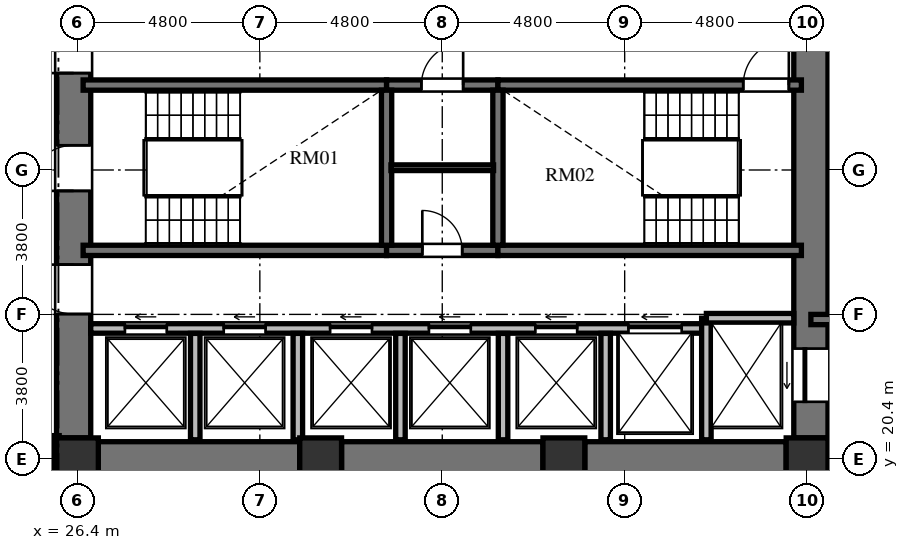
"""IFC4 building model, lengths in metres.
Left out: names, types, materials, properties, quantities, classifications, styles, units other than length and angle.
Written with IfcOpenShell. Run it as: python <this file> out.ifc"""

import sys

from ifc_helpers import new_model, si_unit, direction, frame, frame_2d, origin, origin_2d, place, context, subcontext, project, spatial, rectangle, extrude, element, fill, save


model = new_model("IFC4")
c1 = context("Model", 3, precision=1e-05, world=origin(), true_north=direction((0.0, 1.0)))
c2 = subcontext(c1, "Body", "Model", "MODEL_VIEW")
j1 = project(units=[si_unit("LENGTHUNIT", "METRE"), si_unit("PLANEANGLEUNIT", "RADIAN")], contexts=[c1])
p1 = place(None, origin())
s1 = spatial("IfcSite", under=j1, at=p1, CompositionType="ELEMENT")
p2 = place(p1, origin())
s2 = spatial("IfcBuilding", under=s1, at=p2, CompositionType="ELEMENT")
p3 = place(p2, frame((0.0, 0.0, 76.272)))
s3 = spatial("IfcBuildingStorey", under=s2, at=p3, CompositionType="ELEMENT", Elevation=76.272)
for number, where, z_axis, x_axis in (
    (1, (26.4, 20.4, 0.0), (0.0, 0.0, 1.0), (1.0, 0.0, 0.0)),
    (2, (32.8, 20.4, 0.0), (0.0, 0.0, 1.0), (1.0, 0.0, 0.0)),
    (3, (39.2, 20.4, 0.0), (0.0, 0.0, 1.0), (1.0, 0.0, 0.0)),
    (4, (45.6, 20.4, 0.0), (0.0, 0.0, 1.0), (1.0, 0.0, 0.0)),
):
    element("IfcColumn", number, at=place(p3, frame(where, z_axis=z_axis, x_axis=x_axis)), inside=s3, PredefinedType="COLUMN", context=c2, shape_type="SweptSolid", body=[
        extrude(rectangle(XDim=1.1, YDim=1.1, at=origin_2d()), origin(), (0.0, 0.0, 1.0), 5.472),
    ])
p4 = place(p3, frame((26.3, 20.95, 0.0), z_axis=(0.0, 0.0, 1.0), x_axis=(0.0, 1.0, 0.0)))
e5 = element("IfcWall", 5, at=p4, inside=s3, PredefinedType="SHEAR", context=c2, shape_type="SweptSolid", body=[
    extrude(rectangle(XDim=14.1, YDim=0.9, at=frame_2d((7.05, 0.0))), origin(), (0.0, 0.0, 1.0), 5.472),
])
p5 = place(p4, frame((6.5, 0.0, 0.0)))
e6 = element("IfcOpeningElement", 6, at=p5, cuts=e5, PredefinedType="OPENING", context=c2, shape_type="SweptSolid", body=[
    extrude(rectangle(XDim=1.2, YDim=2.15, at=frame_2d((0.6, 1.075))), frame((0.0, 0.46, 0.0), z_axis=(0.0, -1.0, 0.0), x_axis=(1.0, 0.0, 0.0)), (0.0, 0.0, 1.0), 0.92),
])
p6 = place(p4, frame((9.6, 0.0, 0.0)))
e7 = element("IfcOpeningElement", 7, at=p6, cuts=e5, PredefinedType="OPENING", context=c2, shape_type="SweptSolid", body=[
    extrude(rectangle(XDim=1.3, YDim=2.2, at=frame_2d((0.65, 1.1))), frame((0.0, 0.46, 0.0), z_axis=(0.0, -1.0, 0.0), x_axis=(1.0, 0.0, 0.0)), (0.0, 0.0, 1.0), 0.92),
])
p7 = place(p4, frame((3.26, 0.0, 0.0)))
e8 = element("IfcOpeningElement", 8, at=p7, cuts=e5, PredefinedType="OPENING", context=c2, shape_type="SweptSolid", body=[
    extrude(rectangle(XDim=1.3, YDim=2.2, at=frame_2d((0.65, 1.1))), frame((0.0, 0.46, 0.0), z_axis=(0.0, -1.0, 0.0), x_axis=(1.0, 0.0, 0.0)), (0.0, 0.0, 1.0), 0.92),
])
p8 = place(p3, frame((45.7, 20.95, 0.0), z_axis=(0.0, 0.0, 1.0), x_axis=(0.0, 1.0, 0.0)))
e9 = element("IfcWall", 9, at=p8, inside=s3, PredefinedType="SHEAR", context=c2, shape_type="SweptSolid", body=[
    extrude(rectangle(XDim=14.1, YDim=0.9, at=frame_2d((7.05, 0.0))), origin(), (0.0, 0.0, 1.0), 5.472),
])
p9 = place(p8, frame((11.75, 0.0, 0.0)))
e10 = element("IfcOpeningElement", 10, at=p9, cuts=e9, PredefinedType="OPENING", context=c2, shape_type="SweptSolid", body=[
    extrude(rectangle(XDim=1.4, YDim=2.3, at=frame_2d((0.7, 1.15))), frame((0.0, 0.46, 0.0), z_axis=(0.0, -1.0, 0.0), x_axis=(1.0, 0.0, 0.0)), (0.0, 0.0, 1.0), 0.92),
])
p10 = place(p8, frame((0.95, 0.0, 0.0)))
e11 = element("IfcOpeningElement", 11, at=p10, cuts=e9, PredefinedType="OPENING", context=c2, shape_type="SweptSolid", body=[
    extrude(rectangle(XDim=1.4, YDim=2.3, at=frame_2d((0.7, 1.15))), frame((0.0, 0.46, 0.0), z_axis=(0.0, -1.0, 0.0), x_axis=(1.0, 0.0, 0.0)), (0.0, 0.0, 1.0), 0.92),
])
p11 = place(p3, frame((26.95, 20.4, 0.0), z_axis=(0.0, 0.0, 1.0), x_axis=(1.0, 0.0, 0.0)))
e12 = element("IfcWall", 12, at=p11, inside=s3, PredefinedType="SHEAR", context=c2, shape_type="SweptSolid", body=[
    extrude(rectangle(XDim=5.3, YDim=0.9, at=frame_2d((2.65, 0.0))), origin(), (0.0, 0.0, 1.0), 5.472),
])
p12 = place(p3, frame((33.35, 20.4, 0.0), z_axis=(0.0, 0.0, 1.0), x_axis=(1.0, 0.0, 0.0)))
e13 = element("IfcWall", 13, at=p12, inside=s3, PredefinedType="SHEAR", context=c2, shape_type="SweptSolid", body=[
    extrude(rectangle(XDim=5.3, YDim=0.9, at=frame_2d((2.65, 0.0))), origin(), (0.0, 0.0, 1.0), 5.472),
])
p13 = place(p3, frame((39.75, 20.4, 0.0), z_axis=(0.0, 0.0, 1.0), x_axis=(1.0, 0.0, 0.0)))
e14 = element("IfcWall", 14, at=p13, inside=s3, PredefinedType="SHEAR", context=c2, shape_type="SweptSolid", body=[
    extrude(rectangle(XDim=5.3, YDim=0.9, at=frame_2d((2.65, 0.0))), origin(), (0.0, 0.0, 1.0), 5.472),
])
p14 = place(p3, frame((26.55, 30.235, 0.0), z_axis=(0.0, 0.0, 1.0), x_axis=(1.0, 0.0, 0.0)))
e15 = element("IfcWall", 15, at=p14, inside=s3, PredefinedType="SHEAR", context=c2, shape_type="SweptSolid", body=[
    extrude(rectangle(XDim=7.985, YDim=0.27, at=frame_2d((3.992, 0.0))), origin(), (0.0, 0.0, 1.0), 5.472),
])
p15 = place(p3, frame((34.535, 30.235, 0.0), z_axis=(0.0, 0.0, 1.0), x_axis=(1.0, 0.0, 0.0)))
e16 = element("IfcWall", 16, at=p15, inside=s3, PredefinedType="SHEAR", context=c2, shape_type="SweptSolid", body=[
    extrude(rectangle(XDim=2.93, YDim=0.27, at=frame_2d((1.465, 0.0))), origin(), (0.0, 0.0, 1.0), 5.472),
])
p16 = place(p15, frame((0.915, 0.0, 0.0)))
e17 = element("IfcOpeningElement", 17, at=p16, cuts=e16, PredefinedType="OPENING", context=c2, shape_type="SweptSolid", body=[
    extrude(rectangle(XDim=1.1, YDim=2.15, at=frame_2d((0.55, 1.075))), frame((0.0, 0.145, 0.0), z_axis=(0.0, -1.0, 0.0), x_axis=(1.0, 0.0, 0.0)), (0.0, 0.0, 1.0), 0.29),
])
p17 = place(p3, frame((37.465, 30.235, 0.0), z_axis=(0.0, 0.0, 1.0), x_axis=(1.0, 0.0, 0.0)))
e18 = element("IfcWall", 18, at=p17, inside=s3, PredefinedType="SHEAR", context=c2, shape_type="SweptSolid", body=[
    extrude(rectangle(XDim=7.985, YDim=0.27, at=frame_2d((3.992, 0.0))), origin(), (0.0, 0.0, 1.0), 5.472),
])
p18 = place(p17, frame((6.455, 0.0, 0.0)))
e19 = element("IfcOpeningElement", 19, at=p18, cuts=e18, PredefinedType="OPENING", context=c2, shape_type="SweptSolid", body=[
    extrude(rectangle(XDim=1.2, YDim=2.15, at=frame_2d((0.6, 1.075))), frame((0.0, 0.145, 0.0), z_axis=(0.0, -1.0, 0.0), x_axis=(1.0, 0.0, 0.0)), (0.0, 0.0, 1.0), 0.29),
])
p19 = place(p3, frame((26.55, 25.885, 0.0), z_axis=(0.0, 0.0, 1.0), x_axis=(1.0, 0.0, 0.0)))
e20 = element("IfcWall", 20, at=p19, inside=s3, PredefinedType="SHEAR", context=c2, shape_type="SweptSolid", body=[
    extrude(rectangle(XDim=7.985, YDim=0.27, at=frame_2d((3.992, 0.0))), origin(), (0.0, 0.0, 1.0), 5.472),
])
p20 = place(p3, frame((34.535, 25.885, 0.0), z_axis=(0.0, 0.0, 1.0), x_axis=(1.0, 0.0, 0.0)))
e21 = element("IfcWall", 21, at=p20, inside=s3, PredefinedType="SHEAR", context=c2, shape_type="SweptSolid", body=[
    extrude(rectangle(XDim=2.93, YDim=0.27, at=frame_2d((1.465, 0.0))), origin(), (0.0, 0.0, 1.0), 5.472),
])
p21 = place(p20, frame((0.94, 0.0, 0.0)))
e22 = element("IfcOpeningElement", 22, at=p21, cuts=e21, PredefinedType="OPENING", context=c2, shape_type="SweptSolid", body=[
    extrude(rectangle(XDim=1.05, YDim=2.15, at=frame_2d((0.525, 1.075))), frame((0.0, 0.145, 0.0), z_axis=(0.0, -1.0, 0.0), x_axis=(1.0, 0.0, 0.0)), (0.0, 0.0, 1.0), 0.29),
])
p22 = place(p3, frame((37.465, 25.885, 0.0), z_axis=(0.0, 0.0, 1.0), x_axis=(1.0, 0.0, 0.0)))
e23 = element("IfcWall", 23, at=p22, inside=s3, PredefinedType="SHEAR", context=c2, shape_type="SweptSolid", body=[
    extrude(rectangle(XDim=7.985, YDim=0.27, at=frame_2d((3.992, 0.0))), origin(), (0.0, 0.0, 1.0), 5.472),
])
for number, where, z_axis, x_axis in (
    (24, (34.535, 26.02, 0.0), (0.0, 0.0, 1.0), (0.0, 1.0, 0.0)),
    (25, (37.465, 26.02, 0.0), (0.0, 0.0, 1.0), (0.0, 1.0, 0.0)),
):
    element("IfcWall", number, at=place(p3, frame(where, z_axis=z_axis, x_axis=x_axis)), inside=s3, PredefinedType="SHEAR", context=c2, shape_type="SweptSolid", body=[
        extrude(rectangle(XDim=4.08, YDim=0.27, at=frame_2d((2.04, 0.0))), origin(), (0.0, 0.0, 1.0), 5.472),
    ])
p23 = place(p3, frame((34.65, 28.06, 0.0), z_axis=(0.0, 0.0, 1.0), x_axis=(1.0, 0.0, 0.0)))
e26 = element("IfcWall", 26, at=p23, inside=s3, PredefinedType="PARTITIONING", context=c2, shape_type="SweptSolid", body=[
    extrude(rectangle(XDim=2.7, YDim=0.15, at=frame_2d((1.35, 0.0))), origin(), (0.0, 0.0, 1.0), 5.022),
])
p24 = place(p3, frame((26.75, 23.83, 0.0), z_axis=(0.0, 0.0, 1.0), x_axis=(1.0, 0.0, 0.0)))
e27 = element("IfcWall", 27, at=p24, inside=s3, PredefinedType="SOLIDWALL", context=c2, shape_type="SweptSolid", body=[
    extrude(rectangle(XDim=16.2, YDim=0.25, at=frame_2d((8.1, 0.0))), origin(), (0.0, 0.0, 1.0), 5.022),
])
p25 = place(p24, frame((0.9, 0.0, 0.0)))
e28 = element("IfcOpeningElement", 28, at=p25, cuts=e27, PredefinedType="OPENING", context=c2, shape_type="SweptSolid", body=[
    extrude(rectangle(XDim=1.1, YDim=2.2, at=frame_2d((0.55, 1.1))), frame((0.0, 0.135, 0.0), z_axis=(0.0, -1.0, 0.0), x_axis=(1.0, 0.0, 0.0)), (0.0, 0.0, 1.0), 0.27),
])
p26 = place(p24, frame((3.5, 0.0, 0.0)))
e29 = element("IfcOpeningElement", 29, at=p26, cuts=e27, PredefinedType="OPENING", context=c2, shape_type="SweptSolid", body=[
    extrude(rectangle(XDim=1.1, YDim=2.2, at=frame_2d((0.55, 1.1))), frame((0.0, 0.135, 0.0), z_axis=(0.0, -1.0, 0.0), x_axis=(1.0, 0.0, 0.0)), (0.0, 0.0, 1.0), 0.27),
])
p27 = place(p24, frame((6.3, 0.0, 0.0)))
e30 = element("IfcOpeningElement", 30, at=p27, cuts=e27, PredefinedType="OPENING", context=c2, shape_type="SweptSolid", body=[
    extrude(rectangle(XDim=1.1, YDim=2.2, at=frame_2d((0.55, 1.1))), frame((0.0, 0.135, 0.0), z_axis=(0.0, -1.0, 0.0), x_axis=(1.0, 0.0, 0.0)), (0.0, 0.0, 1.0), 0.27),
])
p28 = place(p24, frame((8.9, 0.0, 0.0)))
e31 = element("IfcOpeningElement", 31, at=p28, cuts=e27, PredefinedType="OPENING", context=c2, shape_type="SweptSolid", body=[
    extrude(rectangle(XDim=1.1, YDim=2.2, at=frame_2d((0.55, 1.1))), frame((0.0, 0.135, 0.0), z_axis=(0.0, -1.0, 0.0), x_axis=(1.0, 0.0, 0.0)), (0.0, 0.0, 1.0), 0.27),
])
p29 = place(p24, frame((11.7, 0.0, 0.0)))
e32 = element("IfcOpeningElement", 32, at=p29, cuts=e27, PredefinedType="OPENING", context=c2, shape_type="SweptSolid", body=[
    extrude(rectangle(XDim=1.1, YDim=2.2, at=frame_2d((0.55, 1.1))), frame((0.0, 0.135, 0.0), z_axis=(0.0, -1.0, 0.0), x_axis=(1.0, 0.0, 0.0)), (0.0, 0.0, 1.0), 0.27),
])
p30 = place(p24, frame((14.15, 0.0, 0.0)))
e33 = element("IfcOpeningElement", 33, at=p30, cuts=e27, PredefinedType="OPENING", context=c2, shape_type="SweptSolid", body=[
    extrude(rectangle(XDim=1.4, YDim=2.3, at=frame_2d((0.7, 1.15))), frame((0.0, 0.135, 0.0), z_axis=(0.0, -1.0, 0.0), x_axis=(1.0, 0.0, 0.0)), (0.0, 0.0, 1.0), 0.27),
])
p31 = place(p3, frame((42.95, 20.9, 0.0), z_axis=(0.0, 0.0, 1.0), x_axis=(0.0, 1.0, 0.0)))
e34 = element("IfcWall", 34, at=p31, inside=s3, PredefinedType="SOLIDWALL", context=c2, shape_type="SweptSolid", body=[
    extrude(rectangle(XDim=3.2, YDim=0.25, at=frame_2d((1.6, 0.0))), origin(), (0.0, 0.0, 1.0), 5.022),
])
p32 = place(p3, frame((42.95, 24.1, 0.0), z_axis=(0.0, 0.0, 1.0), x_axis=(1.0, 0.0, 0.0)))
e35 = element("IfcWall", 35, at=p32, inside=s3, PredefinedType="SOLIDWALL", context=c2, shape_type="SweptSolid", body=[
    extrude(rectangle(XDim=2.3, YDim=0.25, at=frame_2d((1.15, 0.0))), origin(), (0.0, 0.0, 1.0), 5.022),
])
for number, where, z_axis, x_axis in (
    (36, (29.5, 20.9, 0.0), (0.0, 0.0, 1.0), (0.0, 1.0, 0.0)),
    (37, (32.2, 20.9, 0.0), (0.0, 0.0, 1.0), (0.0, 1.0, 0.0)),
    (38, (34.9, 20.9, 0.0), (0.0, 0.0, 1.0), (0.0, 1.0, 0.0)),
    (39, (37.6, 20.9, 0.0), (0.0, 0.0, 1.0), (0.0, 1.0, 0.0)),
    (40, (40.3, 20.9, 0.0), (0.0, 0.0, 1.0), (0.0, 1.0, 0.0)),
):
    element("IfcWall", number, at=place(p3, frame(where, z_axis=z_axis, x_axis=x_axis)), inside=s3, PredefinedType="SOLIDWALL", context=c2, shape_type="SweptSolid", body=[
        extrude(rectangle(XDim=2.8, YDim=0.25, at=frame_2d((1.4, 0.0))), origin(), (0.0, 0.0, 1.0), 5.022),
    ])
p33 = place(p3, frame((45.7, 24.065, 0.0), z_axis=(0.0, 0.0, 1.0), x_axis=(1.0, 0.0, 0.0)))
e41 = element("IfcWall", 41, at=p33, inside=s3, PredefinedType="SHEAR", context=c2, shape_type="SweptSolid", body=[
    extrude(rectangle(XDim=4.715, YDim=0.27, at=frame_2d((2.357, 0.0))), origin(), (0.0, 0.0, 1.0), 5.472),
])
p34 = place(p3, frame((45.7, 20.02, 0.0), z_axis=(0.0, 0.0, 1.0), x_axis=(1.0, 0.0, 0.0)))
e42 = element("IfcWall", 42, at=p34, inside=s3, PredefinedType="SOLIDWALL", context=c2, shape_type="SweptSolid", body=[
    extrude(rectangle(XDim=4.715, YDim=0.25, at=frame_2d((2.357, 0.0))), origin(), (0.0, 0.0, 1.0), 3.607),
])
p35 = place(p3, frame((25.83, 21.01, 0.0), z_axis=(0.0, 0.0, 1.0), x_axis=(0.0, -1.0, 0.0)))
e43 = element("IfcWall", 43, at=p35, inside=s3, PredefinedType="PARTITIONING", context=c2, shape_type="SweptSolid", body=[
    extrude(rectangle(XDim=1.22, YDim=0.18, at=frame_2d((0.61, 0.0))), origin(), (0.0, 0.0, 1.0), 5.022),
])
p36 = place(p5, origin())
e44 = element("IfcDoor", 44, at=p36, inside=s3, OperationType="SINGLE_SWING_LEFT", PredefinedType="DOOR", context=c2, shape_type="SweptSolid", body=[
    extrude(rectangle(XDim=1.2, YDim=2.15, at=frame_2d((0.6, 1.075))), frame((0.0, 0.025, 0.0), z_axis=(0.0, -1.0, 0.0), x_axis=(1.0, 0.0, 0.0)), (0.0, 0.0, 1.0), 0.05),
])
fill(e6, e44)
p37 = place(p18, origin())
e45 = element("IfcDoor", 45, at=p37, inside=s3, OperationType="SINGLE_SWING_RIGHT", PredefinedType="DOOR", context=c2, shape_type="SweptSolid", body=[
    extrude(rectangle(XDim=1.2, YDim=2.15, at=frame_2d((0.6, 1.075))), frame((0.0, 0.025, 0.0), z_axis=(0.0, -1.0, 0.0), x_axis=(1.0, 0.0, 0.0)), (0.0, 0.0, 1.0), 0.05),
])
fill(e19, e45)
p38 = place(p21, origin())
e46 = element("IfcDoor", 46, at=p38, inside=s3, OperationType="SINGLE_SWING_LEFT", PredefinedType="DOOR", context=c2, shape_type="SweptSolid", body=[
    extrude(rectangle(XDim=1.05, YDim=2.15, at=frame_2d((0.525, 1.075))), frame((0.0, 0.025, 0.0), z_axis=(0.0, -1.0, 0.0), x_axis=(1.0, 0.0, 0.0)), (0.0, 0.0, 1.0), 0.05),
])
fill(e22, e46)
p39 = place(p16, origin())
e47 = element("IfcDoor", 47, at=p39, inside=s3, OperationType="SINGLE_SWING_RIGHT", PredefinedType="DOOR", context=c2, shape_type="SweptSolid", body=[
    extrude(rectangle(XDim=1.1, YDim=2.15, at=frame_2d((0.55, 1.075))), frame((0.0, 0.025, 0.0), z_axis=(0.0, -1.0, 0.0), x_axis=(1.0, 0.0, 0.0)), (0.0, 0.0, 1.0), 0.05),
])
fill(e17, e47)
p40 = place(p6, origin())
e48 = element("IfcDoor", 48, at=p40, inside=s3, OperationType="SINGLE_SWING_LEFT", PredefinedType="DOOR", context=c2, shape_type="SweptSolid", body=[
    extrude(rectangle(XDim=1.3, YDim=2.2, at=frame_2d((0.65, 1.1))), frame((0.0, 0.025, 0.0), z_axis=(0.0, -1.0, 0.0), x_axis=(1.0, 0.0, 0.0)), (0.0, 0.0, 1.0), 0.05),
])
fill(e7, e48)
p41 = place(p7, origin())
e49 = element("IfcDoor", 49, at=p41, inside=s3, OperationType="SINGLE_SWING_RIGHT", PredefinedType="DOOR", context=c2, shape_type="SweptSolid", body=[
    extrude(rectangle(XDim=1.3, YDim=2.2, at=frame_2d((0.65, 1.1))), frame((0.0, 0.025, 0.0), z_axis=(0.0, -1.0, 0.0), x_axis=(1.0, 0.0, 0.0)), (0.0, 0.0, 1.0), 0.05),
])
fill(e8, e49)
p42 = place(p25, origin())
e50 = element("IfcDoor", 50, at=p42, inside=s3, OperationType="SLIDING_TO_LEFT", PredefinedType="DOOR", context=c2, shape_type="SweptSolid", body=[
    extrude(rectangle(XDim=1.1, YDim=2.2, at=frame_2d((0.55, 1.1))), frame((0.0, 0.025, 0.0), z_axis=(0.0, -1.0, 0.0), x_axis=(1.0, 0.0, 0.0)), (0.0, 0.0, 1.0), 0.05),
])
fill(e28, e50)
p43 = place(p26, origin())
e51 = element("IfcDoor", 51, at=p43, inside=s3, OperationType="SLIDING_TO_LEFT", PredefinedType="DOOR", context=c2, shape_type="SweptSolid", body=[
    extrude(rectangle(XDim=1.1, YDim=2.2, at=frame_2d((0.55, 1.1))), frame((0.0, 0.025, 0.0), z_axis=(0.0, -1.0, 0.0), x_axis=(1.0, 0.0, 0.0)), (0.0, 0.0, 1.0), 0.05),
])
fill(e29, e51)
p44 = place(p27, origin())
e52 = element("IfcDoor", 52, at=p44, inside=s3, OperationType="SLIDING_TO_LEFT", PredefinedType="DOOR", context=c2, shape_type="SweptSolid", body=[
    extrude(rectangle(XDim=1.1, YDim=2.2, at=frame_2d((0.55, 1.1))), frame((0.0, 0.025, 0.0), z_axis=(0.0, -1.0, 0.0), x_axis=(1.0, 0.0, 0.0)), (0.0, 0.0, 1.0), 0.05),
])
fill(e30, e52)
p45 = place(p28, origin())
e53 = element("IfcDoor", 53, at=p45, inside=s3, OperationType="SLIDING_TO_LEFT", PredefinedType="DOOR", context=c2, shape_type="SweptSolid", body=[
    extrude(rectangle(XDim=1.1, YDim=2.2, at=frame_2d((0.55, 1.1))), frame((0.0, 0.025, 0.0), z_axis=(0.0, -1.0, 0.0), x_axis=(1.0, 0.0, 0.0)), (0.0, 0.0, 1.0), 0.05),
])
fill(e31, e53)
p46 = place(p29, origin())
e54 = element("IfcDoor", 54, at=p46, inside=s3, OperationType="SLIDING_TO_LEFT", PredefinedType="DOOR", context=c2, shape_type="SweptSolid", body=[
    extrude(rectangle(XDim=1.1, YDim=2.2, at=frame_2d((0.55, 1.1))), frame((0.0, 0.025, 0.0), z_axis=(0.0, -1.0, 0.0), x_axis=(1.0, 0.0, 0.0)), (0.0, 0.0, 1.0), 0.05),
])
fill(e32, e54)
p47 = place(p10, origin())
e55 = element("IfcDoor", 55, at=p47, inside=s3, OperationType="SLIDING_TO_LEFT", PredefinedType="DOOR", context=c2, shape_type="SweptSolid", body=[
    extrude(rectangle(XDim=1.4, YDim=2.3, at=frame_2d((0.7, 1.15))), frame((0.0, 0.025, 0.0), z_axis=(0.0, -1.0, 0.0), x_axis=(1.0, 0.0, 0.0)), (0.0, 0.0, 1.0), 0.05),
])
fill(e11, e55)
p48 = place(p30, origin())
e56 = element("IfcDoor", 56, at=p48, inside=s3, OperationType="SLIDING_TO_LEFT", PredefinedType="DOOR", context=c2, shape_type="SweptSolid", body=[
    extrude(rectangle(XDim=1.4, YDim=2.3, at=frame_2d((0.7, 1.15))), frame((0.0, 0.025, 0.0), z_axis=(0.0, -1.0, 0.0), x_axis=(1.0, 0.0, 0.0)), (0.0, 0.0, 1.0), 0.05),
])
fill(e33, e56)
save(model, sys.argv[1])
